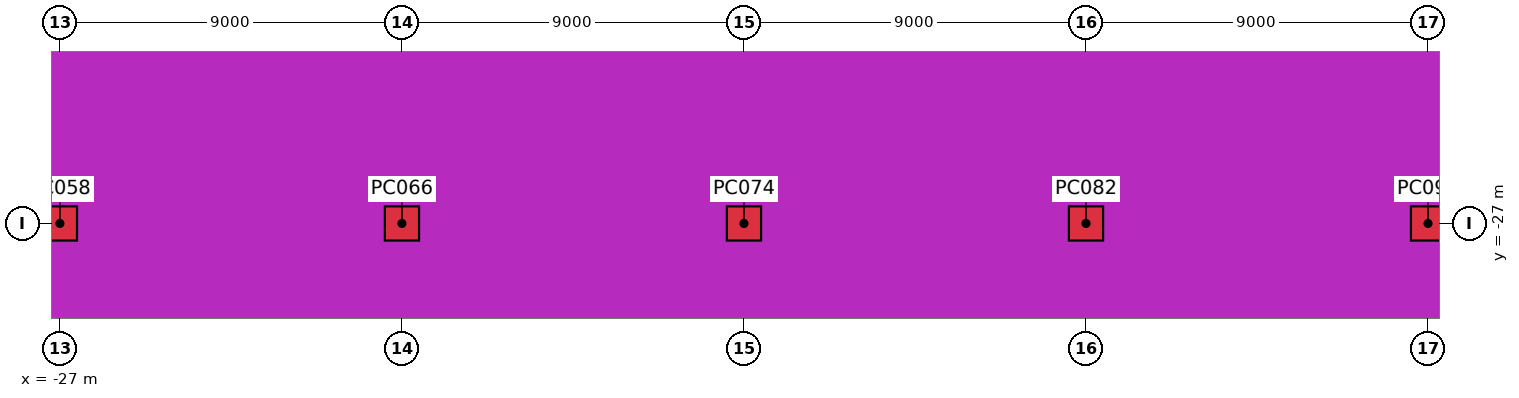
"""IFC4 building model, lengths in metres.
Left out: names, types, materials, properties, quantities, classifications, styles, units other than length and angle.
Written with IfcOpenShell. Run it as: python <this file> out.ifc"""

import sys

from ifc_helpers import new_model, si_unit, direction, frame, origin, origin_2d, place, context, subcontext, project, spatial, rectangle, extrude, element, save


model = new_model("IFC4")
c1 = context("Model", 3, precision=1e-05, world=origin(), true_north=direction((0.0, 1.0)))
c2 = subcontext(c1, "Body", "Model", "MODEL_VIEW")
j1 = project(units=[si_unit("LENGTHUNIT", "METRE"), si_unit("PLANEANGLEUNIT", "RADIAN")], contexts=[c1])
p1 = place(None, origin())
s1 = spatial("IfcSite", under=j1, at=p1, CompositionType="ELEMENT")
p2 = place(p1, origin())
s2 = spatial("IfcBuilding", under=s1, at=p2, CompositionType="ELEMENT")
p3 = place(p2, frame((0.0, 0.0, -4.5)))
s3 = spatial("IfcBuildingStorey", under=s2, at=p3, CompositionType="ELEMENT", Elevation=-4.5)
for number, where, z_axis, x_axis in (
    (1, (-27.0, -27.0, 0.0), (0.0, 0.0, 1.0), (1.0, 0.0, 0.0)),
    (2, (-18.0, -27.0, 0.0), (0.0, 0.0, 1.0), (1.0, 0.0, 0.0)),
    (3, (-9.0, -27.0, 0.0), (0.0, 0.0, 1.0), (1.0, 0.0, 0.0)),
    (4, (0.0, -27.0, 0.0), (0.0, 0.0, 1.0), (1.0, 0.0, 0.0)),
    (5, (9.0, -27.0, 0.0), (0.0, 0.0, 1.0), (1.0, 0.0, 0.0)),
):
    element("IfcColumn", number, at=place(p3, frame(where, z_axis=z_axis, x_axis=x_axis)), inside=s3, PredefinedType="COLUMN", context=c2, shape_type="SweptSolid", body=[
        extrude(rectangle(XDim=0.9, YDim=0.9, at=origin_2d()), origin(), (0.0, 0.0, 1.0), 3.9),
    ])
save(model, sys.argv[1])
